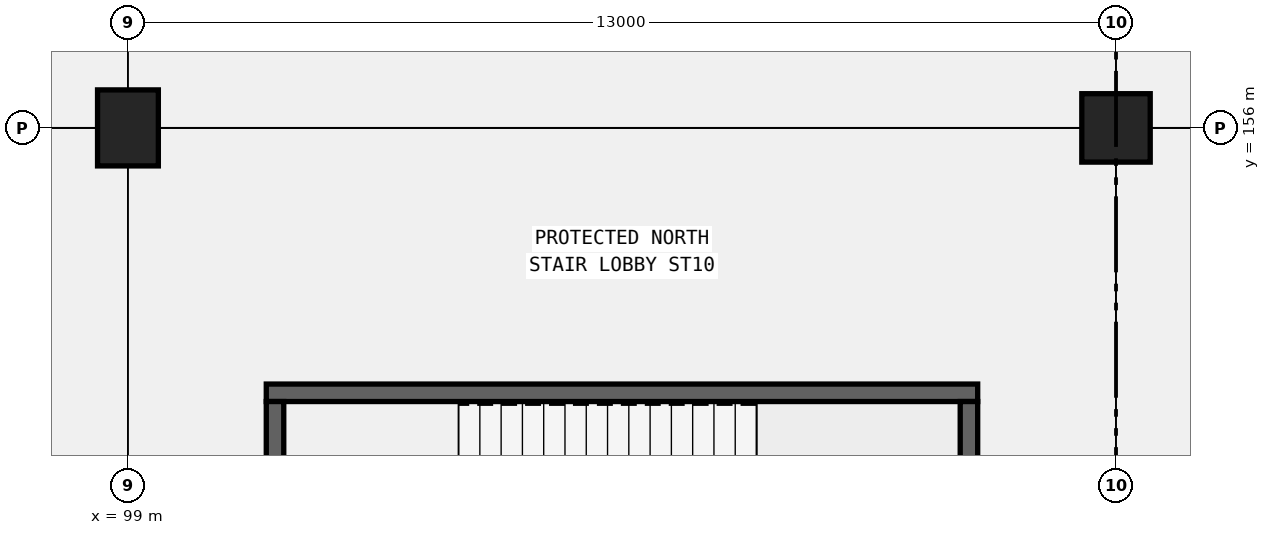
"""IFC4 building model, lengths in metres.
Left out: names, types, materials, properties, quantities, classifications, styles, units other than length and angle.
Written with IfcOpenShell. Run it as: python <this file> out.ifc"""

import sys

from ifc_helpers import new_model, si_unit, direction, frame, frame_2d, origin, origin_2d, place, context, subcontext, project, spatial, rectangle, extrude, element, save


model = new_model("IFC4")
c1 = context("Model", 3, precision=1e-05, world=origin(), true_north=direction((0.0, 1.0)))
c2 = subcontext(c1, "Body", "Model", "MODEL_VIEW")
j1 = project(units=[si_unit("LENGTHUNIT", "METRE"), si_unit("PLANEANGLEUNIT", "RADIAN")], contexts=[c1])
p1 = place(None, origin())
s1 = spatial("IfcSite", under=j1, at=p1, CompositionType="ELEMENT")
p2 = place(p1, origin())
s2 = spatial("IfcBuilding", under=s1, at=p2, CompositionType="ELEMENT")
p3 = place(p2, frame((0.0, 0.0, 10.2)))
s3 = spatial("IfcBuildingStorey", under=s2, at=p3, CompositionType="ELEMENT", Elevation=10.2)
p4 = place(p3, frame((99.0, 156.0, 0.0), z_axis=(0.0, 0.0, 1.0), x_axis=(1.0, 0.0, 0.0)))
e1 = element("IfcColumn", 1, at=p4, inside=s3, PredefinedType="COLUMN", context=c2, shape_type="SweptSolid", body=[
    extrude(rectangle(XDim=0.8, YDim=1.0, at=origin_2d()), origin(), (0.0, 0.0, 1.0), 5.1),
])
p5 = place(p3, frame((112.0, 156.0, 0.0), z_axis=(0.0, 0.0, 1.0), x_axis=(1.0, 0.0, 0.0)))
e2 = element("IfcColumn", 2, at=p5, inside=s3, PredefinedType="COLUMN", context=c2, shape_type="SweptSolid", body=[
    extrude(rectangle(XDim=0.9, YDim=0.9, at=origin_2d()), origin(), (0.0, 0.0, 1.0), 5.1),
])
p6 = place(p3, frame((100.82, 152.515, 0.0), z_axis=(0.0, 0.0, 1.0), x_axis=(1.0, 0.0, 0.0)))
e3 = element("IfcWall", 3, at=p6, inside=s3, PredefinedType="SHEAR", context=c2, shape_type="SweptSolid", body=[
    extrude(rectangle(XDim=9.36, YDim=0.23, at=frame_2d((4.68, 0.0))), origin(), (0.0, 0.0, 1.0), 4.82),
])
for number, where, z_axis, x_axis in (
    (4, (100.935, 147.6, 0.0), (0.0, 0.0, 1.0), (0.0, 1.0, 0.0)),
    (5, (110.065, 147.6, 0.0), (0.0, 0.0, 1.0), (0.0, 1.0, 0.0)),
):
    element("IfcWall", number, at=place(p3, frame(where, z_axis=z_axis, x_axis=x_axis)), inside=s3, PredefinedType="SHEAR", context=c2, shape_type="SweptSolid", body=[
        extrude(rectangle(XDim=4.8, YDim=0.23, at=frame_2d((2.4, 0.0))), origin(), (0.0, 0.0, 1.0), 4.82),
    ])
save(model, sys.argv[1])
